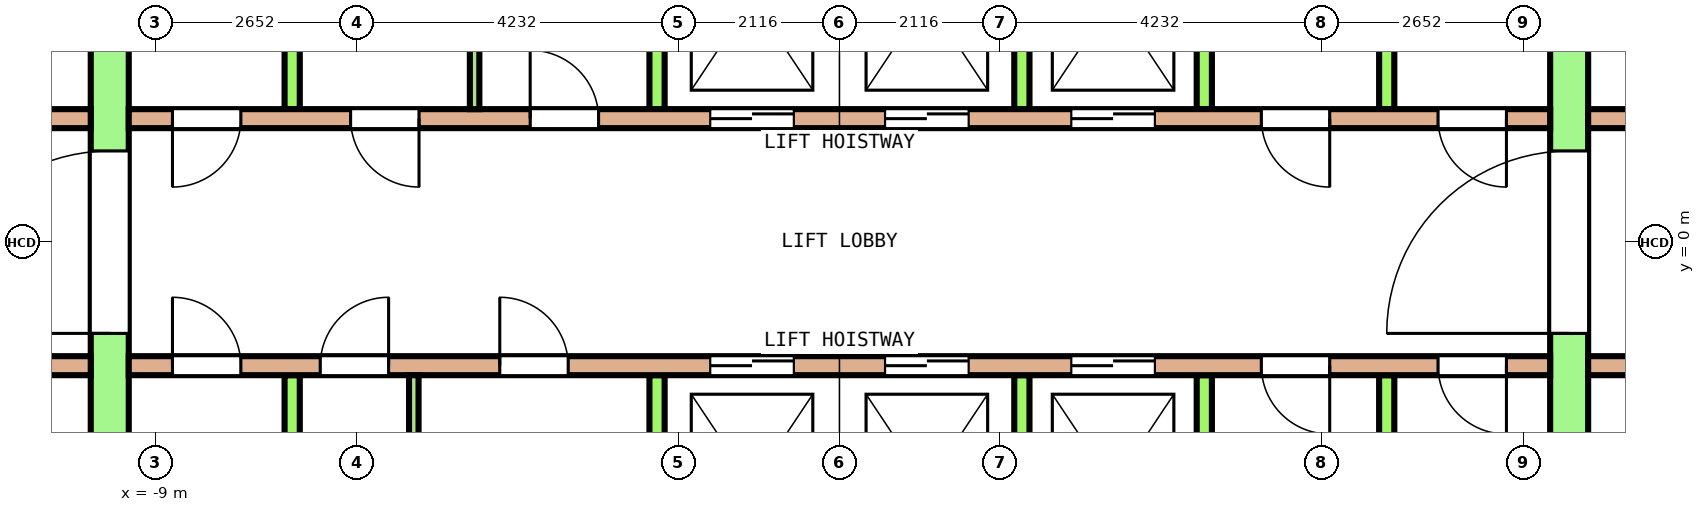
"""IFC4 building model, lengths in metres.
Left out: names, types, materials, properties, quantities, classifications, styles, units other than length and angle.
Written with IfcOpenShell. Run it as: python <this file> out.ifc"""

import sys

from ifc_helpers import new_model, si_unit, direction, frame, frame_2d, origin, place, context, subcontext, project, spatial, rectangle, extrude, element, fill, save


model = new_model("IFC4")
c1 = context("Model", 3, precision=1e-05, world=origin(), true_north=direction((0.0, 1.0)))
c2 = subcontext(c1, "Body", "Model", "MODEL_VIEW")
j1 = project(units=[si_unit("LENGTHUNIT", "METRE"), si_unit("PLANEANGLEUNIT", "RADIAN")], contexts=[c1])
p1 = place(None, origin())
s1 = spatial("IfcSite", under=j1, at=p1, CompositionType="ELEMENT")
p2 = place(p1, origin())
s2 = spatial("IfcBuilding", under=s1, at=p2, CompositionType="ELEMENT")
p3 = place(p2, frame((0.0, 0.0, 241.4)))
s3 = spatial("IfcBuildingStorey", under=s2, at=p3, CompositionType="ELEMENT", Elevation=241.4)
p4 = place(p3, frame((-9.6, -7.8, 0.0), z_axis=(0.0, 0.0, 1.0), x_axis=(0.0, 1.0, 0.0)))
e1 = element("IfcWall", 1, at=p4, inside=s3, PredefinedType="SHEAR", context=c2, shape_type="SweptSolid", body=[
    extrude(rectangle(XDim=15.6, YDim=0.5, at=frame_2d((7.8, 0.0))), origin(), (0.0, 0.0, 1.0), 3.7),
])
p5 = place(p4, frame((6.6, 0.0, 0.0)))
e2 = element("IfcOpeningElement", 2, at=p5, cuts=e1, PredefinedType="OPENING", context=c2, shape_type="SweptSolid", body=[
    extrude(rectangle(XDim=2.4, YDim=2.1, at=frame_2d((1.2, 1.05))), frame((0.0, 0.26, 0.0), z_axis=(0.0, -1.0, 0.0), x_axis=(1.0, 0.0, 0.0)), (0.0, 0.0, 1.0), 0.52),
])
p6 = place(p4, frame((13.5, 0.0, 0.0)))
e3 = element("IfcOpeningElement", 3, at=p6, cuts=e1, PredefinedType="OPENING", context=c2, shape_type="SweptSolid", body=[
    extrude(rectangle(XDim=1.2, YDim=2.1, at=frame_2d((0.6, 1.05))), frame((0.0, 0.26, 0.0), z_axis=(0.0, -1.0, 0.0), x_axis=(1.0, 0.0, 0.0)), (0.0, 0.0, 1.0), 0.52),
])
p7 = place(p4, frame((0.9, 0.0, 0.0)))
e4 = element("IfcOpeningElement", 4, at=p7, cuts=e1, PredefinedType="OPENING", context=c2, shape_type="SweptSolid", body=[
    extrude(rectangle(XDim=1.2, YDim=2.1, at=frame_2d((0.6, 1.05))), frame((0.0, 0.26, 0.0), z_axis=(0.0, -1.0, 0.0), x_axis=(1.0, 0.0, 0.0)), (0.0, 0.0, 1.0), 0.52),
])
p8 = place(p3, frame((9.6, -7.8, 0.0), z_axis=(0.0, 0.0, 1.0), x_axis=(0.0, 1.0, 0.0)))
e5 = element("IfcWall", 5, at=p8, inside=s3, PredefinedType="SHEAR", context=c2, shape_type="SweptSolid", body=[
    extrude(rectangle(XDim=15.6, YDim=0.5, at=frame_2d((7.8, 0.0))), origin(), (0.0, 0.0, 1.0), 3.7),
])
p9 = place(p8, frame((6.6, 0.0, 0.0)))
e6 = element("IfcOpeningElement", 6, at=p9, cuts=e5, PredefinedType="OPENING", context=c2, shape_type="SweptSolid", body=[
    extrude(rectangle(XDim=2.4, YDim=2.1, at=frame_2d((1.2, 1.05))), frame((0.0, 0.26, 0.0), z_axis=(0.0, -1.0, 0.0), x_axis=(1.0, 0.0, 0.0)), (0.0, 0.0, 1.0), 0.52),
])
p10 = place(p8, frame((13.5, 0.0, 0.0)))
e7 = element("IfcOpeningElement", 7, at=p10, cuts=e5, PredefinedType="OPENING", context=c2, shape_type="SweptSolid", body=[
    extrude(rectangle(XDim=1.2, YDim=2.1, at=frame_2d((0.6, 1.05))), frame((0.0, 0.26, 0.0), z_axis=(0.0, -1.0, 0.0), x_axis=(1.0, 0.0, 0.0)), (0.0, 0.0, 1.0), 0.52),
])
p11 = place(p8, frame((1.0, 0.0, 0.0)))
e8 = element("IfcOpeningElement", 8, at=p11, cuts=e5, PredefinedType="OPENING", context=c2, shape_type="SweptSolid", body=[
    extrude(rectangle(XDim=1.0, YDim=2.1, at=frame_2d((0.5, 1.05))), frame((0.0, 0.26, 0.0), z_axis=(0.0, -1.0, 0.0), x_axis=(1.0, 0.0, 0.0)), (0.0, 0.0, 1.0), 0.52),
])
p12 = place(p3, frame((-12.9, 1.625, 0.0), z_axis=(0.0, 0.0, 1.0), x_axis=(1.0, 0.0, 0.0)))
e9 = element("IfcWall", 9, at=p12, inside=s3, PredefinedType="SOLIDWALL", context=c2, shape_type="SweptSolid", body=[
    extrude(rectangle(XDim=3.05, YDim=0.25, at=frame_2d((1.525, 0.0))), origin(), (0.0, 0.0, 1.0), 3.7),
])
p13 = place(p12, frame((1.075, 0.0, 0.0)))
e10 = element("IfcOpeningElement", 10, at=p13, cuts=e9, PredefinedType="OPENING", context=c2, shape_type="SweptSolid", body=[
    extrude(rectangle(XDim=0.9, YDim=2.1, at=frame_2d((0.45, 1.05))), frame((0.0, 0.135, 0.0), z_axis=(0.0, -1.0, 0.0), x_axis=(1.0, 0.0, 0.0)), (0.0, 0.0, 1.0), 0.27),
])
p14 = place(p3, frame((-9.35, 1.625, 0.0), z_axis=(0.0, 0.0, 1.0), x_axis=(1.0, 0.0, 0.0)))
e11 = element("IfcWall", 11, at=p14, inside=s3, PredefinedType="SOLIDWALL", context=c2, shape_type="SweptSolid", body=[
    extrude(rectangle(XDim=18.7, YDim=0.25, at=frame_2d((9.35, 0.0))), origin(), (0.0, 0.0, 1.0), 3.7),
])
p15 = place(p14, frame((7.65, 0.0, 0.0)))
e12 = element("IfcOpeningElement", 12, at=p15, cuts=e11, PredefinedType="OPENING", context=c2, shape_type="SweptSolid", body=[
    extrude(rectangle(XDim=1.1, YDim=2.1, at=frame_2d((0.55, 1.05))), frame((0.0, 0.135, 0.0), z_axis=(0.0, -1.0, 0.0), x_axis=(1.0, 0.0, 0.0)), (0.0, 0.0, 1.0), 0.27),
])
p16 = place(p14, frame((9.95, 0.0, 0.0)))
e13 = element("IfcOpeningElement", 13, at=p16, cuts=e11, PredefinedType="OPENING", context=c2, shape_type="SweptSolid", body=[
    extrude(rectangle(XDim=1.1, YDim=2.1, at=frame_2d((0.55, 1.05))), frame((0.0, 0.135, 0.0), z_axis=(0.0, -1.0, 0.0), x_axis=(1.0, 0.0, 0.0)), (0.0, 0.0, 1.0), 0.27),
])
p17 = place(p14, frame((12.4, 0.0, 0.0)))
e14 = element("IfcOpeningElement", 14, at=p17, cuts=e11, PredefinedType="OPENING", context=c2, shape_type="SweptSolid", body=[
    extrude(rectangle(XDim=1.1, YDim=2.1, at=frame_2d((0.55, 1.05))), frame((0.0, 0.135, 0.0), z_axis=(0.0, -1.0, 0.0), x_axis=(1.0, 0.0, 0.0)), (0.0, 0.0, 1.0), 0.27),
])
p18 = place(p14, frame((0.575, 0.0, 0.0)))
e15 = element("IfcOpeningElement", 15, at=p18, cuts=e11, PredefinedType="OPENING", context=c2, shape_type="SweptSolid", body=[
    extrude(rectangle(XDim=0.9, YDim=2.1, at=frame_2d((0.45, 1.05))), frame((0.0, 0.135, 0.0), z_axis=(0.0, -1.0, 0.0), x_axis=(1.0, 0.0, 0.0)), (0.0, 0.0, 1.0), 0.27),
])
p19 = place(p14, frame((2.919, 0.0, 0.0)))
e16 = element("IfcOpeningElement", 16, at=p19, cuts=e11, PredefinedType="OPENING", context=c2, shape_type="SweptSolid", body=[
    extrude(rectangle(XDim=0.9, YDim=2.1, at=frame_2d((0.45, 1.05))), frame((0.0, 0.135, 0.0), z_axis=(0.0, -1.0, 0.0), x_axis=(1.0, 0.0, 0.0)), (0.0, 0.0, 1.0), 0.27),
])
p20 = place(p14, frame((5.281, 0.0, 0.0)))
e17 = element("IfcOpeningElement", 17, at=p20, cuts=e11, PredefinedType="OPENING", context=c2, shape_type="SweptSolid", body=[
    extrude(rectangle(XDim=0.9, YDim=2.1, at=frame_2d((0.45, 1.05))), frame((0.0, 0.135, 0.0), z_axis=(0.0, -1.0, 0.0), x_axis=(1.0, 0.0, 0.0)), (0.0, 0.0, 1.0), 0.27),
])
p21 = place(p14, frame((14.9, 0.0, 0.0)))
e18 = element("IfcOpeningElement", 18, at=p21, cuts=e11, PredefinedType="OPENING", context=c2, shape_type="SweptSolid", body=[
    extrude(rectangle(XDim=0.9, YDim=2.1, at=frame_2d((0.45, 1.05))), frame((0.0, 0.135, 0.0), z_axis=(0.0, -1.0, 0.0), x_axis=(1.0, 0.0, 0.0)), (0.0, 0.0, 1.0), 0.27),
])
p22 = place(p14, frame((17.225, 0.0, 0.0)))
e19 = element("IfcOpeningElement", 19, at=p22, cuts=e11, PredefinedType="OPENING", context=c2, shape_type="SweptSolid", body=[
    extrude(rectangle(XDim=0.9, YDim=2.1, at=frame_2d((0.45, 1.05))), frame((0.0, 0.135, 0.0), z_axis=(0.0, -1.0, 0.0), x_axis=(1.0, 0.0, 0.0)), (0.0, 0.0, 1.0), 0.27),
])
p23 = place(p3, frame((9.85, 1.625, 0.0), z_axis=(0.0, 0.0, 1.0), x_axis=(1.0, 0.0, 0.0)))
e20 = element("IfcWall", 20, at=p23, inside=s3, PredefinedType="SOLIDWALL", context=c2, shape_type="SweptSolid", body=[
    extrude(rectangle(XDim=3.05, YDim=0.25, at=frame_2d((1.525, 0.0))), origin(), (0.0, 0.0, 1.0), 3.7),
])
p24 = place(p23, frame((1.075, 0.0, 0.0)))
e21 = element("IfcOpeningElement", 21, at=p24, cuts=e20, PredefinedType="OPENING", context=c2, shape_type="SweptSolid", body=[
    extrude(rectangle(XDim=0.9, YDim=2.1, at=frame_2d((0.45, 1.05))), frame((0.0, 0.135, 0.0), z_axis=(0.0, -1.0, 0.0), x_axis=(1.0, 0.0, 0.0)), (0.0, 0.0, 1.0), 0.27),
])
for number, where, z_axis, x_axis in (
    (22, (-7.2, 1.75, 0.0), (0.0, 0.0, 1.0), (0.0, 1.0, 0.0)),
    (23, (-2.4, 1.75, 0.0), (0.0, 0.0, 1.0), (0.0, 1.0, 0.0)),
    (24, (2.4, 1.75, 0.0), (0.0, 0.0, 1.0), (0.0, 1.0, 0.0)),
    (25, (4.8, 1.75, 0.0), (0.0, 0.0, 1.0), (0.0, 1.0, 0.0)),
    (26, (7.2, 1.75, 0.0), (0.0, 0.0, 1.0), (0.0, 1.0, 0.0)),
):
    element("IfcWall", number, at=place(p3, frame(where, z_axis=z_axis, x_axis=x_axis)), inside=s3, PredefinedType="SOLIDWALL", context=c2, shape_type="SweptSolid", body=[
        extrude(rectangle(XDim=2.9, YDim=0.2, at=frame_2d((1.45, 0.0))), origin(), (0.0, 0.0, 1.0), 3.7),
    ])
p25 = place(p3, frame((-12.9, -1.625, 0.0), z_axis=(0.0, 0.0, 1.0), x_axis=(1.0, 0.0, 0.0)))
e27 = element("IfcWall", 27, at=p25, inside=s3, PredefinedType="SOLIDWALL", context=c2, shape_type="SweptSolid", body=[
    extrude(rectangle(XDim=3.05, YDim=0.25, at=frame_2d((1.525, 0.0))), origin(), (0.0, 0.0, 1.0), 3.7),
])
p26 = place(p25, frame((1.075, 0.0, 0.0)))
e28 = element("IfcOpeningElement", 28, at=p26, cuts=e27, PredefinedType="OPENING", context=c2, shape_type="SweptSolid", body=[
    extrude(rectangle(XDim=0.9, YDim=2.1, at=frame_2d((0.45, 1.05))), frame((0.0, 0.135, 0.0), z_axis=(0.0, -1.0, 0.0), x_axis=(1.0, 0.0, 0.0)), (0.0, 0.0, 1.0), 0.27),
])
p27 = place(p3, frame((-9.35, -1.625, 0.0), z_axis=(0.0, 0.0, 1.0), x_axis=(1.0, 0.0, 0.0)))
e29 = element("IfcWall", 29, at=p27, inside=s3, PredefinedType="SOLIDWALL", context=c2, shape_type="SweptSolid", body=[
    extrude(rectangle(XDim=18.7, YDim=0.25, at=frame_2d((9.35, 0.0))), origin(), (0.0, 0.0, 1.0), 3.7),
])
p28 = place(p27, frame((7.65, 0.0, 0.0)))
e30 = element("IfcOpeningElement", 30, at=p28, cuts=e29, PredefinedType="OPENING", context=c2, shape_type="SweptSolid", body=[
    extrude(rectangle(XDim=1.1, YDim=2.1, at=frame_2d((0.55, 1.05))), frame((0.0, 0.135, 0.0), z_axis=(0.0, -1.0, 0.0), x_axis=(1.0, 0.0, 0.0)), (0.0, 0.0, 1.0), 0.27),
])
p29 = place(p27, frame((9.95, 0.0, 0.0)))
e31 = element("IfcOpeningElement", 31, at=p29, cuts=e29, PredefinedType="OPENING", context=c2, shape_type="SweptSolid", body=[
    extrude(rectangle(XDim=1.1, YDim=2.1, at=frame_2d((0.55, 1.05))), frame((0.0, 0.135, 0.0), z_axis=(0.0, -1.0, 0.0), x_axis=(1.0, 0.0, 0.0)), (0.0, 0.0, 1.0), 0.27),
])
p30 = place(p27, frame((12.4, 0.0, 0.0)))
e32 = element("IfcOpeningElement", 32, at=p30, cuts=e29, PredefinedType="OPENING", context=c2, shape_type="SweptSolid", body=[
    extrude(rectangle(XDim=1.1, YDim=2.1, at=frame_2d((0.55, 1.05))), frame((0.0, 0.135, 0.0), z_axis=(0.0, -1.0, 0.0), x_axis=(1.0, 0.0, 0.0)), (0.0, 0.0, 1.0), 0.27),
])
p31 = place(p27, frame((0.575, 0.0, 0.0)))
e33 = element("IfcOpeningElement", 33, at=p31, cuts=e29, PredefinedType="OPENING", context=c2, shape_type="SweptSolid", body=[
    extrude(rectangle(XDim=0.9, YDim=2.1, at=frame_2d((0.45, 1.05))), frame((0.0, 0.135, 0.0), z_axis=(0.0, -1.0, 0.0), x_axis=(1.0, 0.0, 0.0)), (0.0, 0.0, 1.0), 0.27),
])
p32 = place(p27, frame((2.519, 0.0, 0.0)))
e34 = element("IfcOpeningElement", 34, at=p32, cuts=e29, PredefinedType="OPENING", context=c2, shape_type="SweptSolid", body=[
    extrude(rectangle(XDim=0.9, YDim=2.1, at=frame_2d((0.45, 1.05))), frame((0.0, 0.135, 0.0), z_axis=(0.0, -1.0, 0.0), x_axis=(1.0, 0.0, 0.0)), (0.0, 0.0, 1.0), 0.27),
])
p33 = place(p27, frame((4.881, 0.0, 0.0)))
e35 = element("IfcOpeningElement", 35, at=p33, cuts=e29, PredefinedType="OPENING", context=c2, shape_type="SweptSolid", body=[
    extrude(rectangle(XDim=0.9, YDim=2.1, at=frame_2d((0.45, 1.05))), frame((0.0, 0.135, 0.0), z_axis=(0.0, -1.0, 0.0), x_axis=(1.0, 0.0, 0.0)), (0.0, 0.0, 1.0), 0.27),
])
p34 = place(p27, frame((14.9, 0.0, 0.0)))
e36 = element("IfcOpeningElement", 36, at=p34, cuts=e29, PredefinedType="OPENING", context=c2, shape_type="SweptSolid", body=[
    extrude(rectangle(XDim=0.9, YDim=2.1, at=frame_2d((0.45, 1.05))), frame((0.0, 0.135, 0.0), z_axis=(0.0, -1.0, 0.0), x_axis=(1.0, 0.0, 0.0)), (0.0, 0.0, 1.0), 0.27),
])
p35 = place(p27, frame((17.225, 0.0, 0.0)))
e37 = element("IfcOpeningElement", 37, at=p35, cuts=e29, PredefinedType="OPENING", context=c2, shape_type="SweptSolid", body=[
    extrude(rectangle(XDim=0.9, YDim=2.1, at=frame_2d((0.45, 1.05))), frame((0.0, 0.135, 0.0), z_axis=(0.0, -1.0, 0.0), x_axis=(1.0, 0.0, 0.0)), (0.0, 0.0, 1.0), 0.27),
])
p36 = place(p3, frame((9.85, -1.625, 0.0), z_axis=(0.0, 0.0, 1.0), x_axis=(1.0, 0.0, 0.0)))
e38 = element("IfcWall", 38, at=p36, inside=s3, PredefinedType="SOLIDWALL", context=c2, shape_type="SweptSolid", body=[
    extrude(rectangle(XDim=3.05, YDim=0.25, at=frame_2d((1.525, 0.0))), origin(), (0.0, 0.0, 1.0), 3.7),
])
p37 = place(p36, frame((1.075, 0.0, 0.0)))
e39 = element("IfcOpeningElement", 39, at=p37, cuts=e38, PredefinedType="OPENING", context=c2, shape_type="SweptSolid", body=[
    extrude(rectangle(XDim=0.9, YDim=2.1, at=frame_2d((0.45, 1.05))), frame((0.0, 0.135, 0.0), z_axis=(0.0, -1.0, 0.0), x_axis=(1.0, 0.0, 0.0)), (0.0, 0.0, 1.0), 0.27),
])
for number, where, z_axis, x_axis in (
    (40, (-7.2, -4.65, 0.0), (0.0, 0.0, 1.0), (0.0, 1.0, 0.0)),
    (41, (-2.4, -4.65, 0.0), (0.0, 0.0, 1.0), (0.0, 1.0, 0.0)),
    (42, (2.4, -4.65, 0.0), (0.0, 0.0, 1.0), (0.0, 1.0, 0.0)),
    (43, (4.8, -4.65, 0.0), (0.0, 0.0, 1.0), (0.0, 1.0, 0.0)),
    (44, (7.2, -4.65, 0.0), (0.0, 0.0, 1.0), (0.0, 1.0, 0.0)),
):
    element("IfcWall", number, at=place(p3, frame(where, z_axis=z_axis, x_axis=x_axis)), inside=s3, PredefinedType="SOLIDWALL", context=c2, shape_type="SweptSolid", body=[
        extrude(rectangle(XDim=2.9, YDim=0.2, at=frame_2d((1.45, 0.0))), origin(), (0.0, 0.0, 1.0), 3.7),
    ])
for number, where, z_axis, x_axis in (
    (45, (-4.8, 1.75, 0.0), (0.0, 0.0, 1.0), (0.0, 1.0, 0.0)),
    (46, (-5.6, -4.65, 0.0), (0.0, 0.0, 1.0), (0.0, 1.0, 0.0)),
):
    element("IfcWall", number, at=place(p3, frame(where, z_axis=z_axis, x_axis=x_axis)), inside=s3, PredefinedType="PARTITIONING", context=c2, shape_type="SweptSolid", body=[
        extrude(rectangle(XDim=2.9, YDim=0.125, at=frame_2d((1.45, 0.0))), origin(), (0.0, 0.0, 1.0), 3.7),
    ])
p38 = place(p15, origin())
e47 = element("IfcDoor", 47, at=p38, inside=s3, OperationType="DOUBLE_DOOR_SLIDING", PredefinedType="DOOR", context=c2, shape_type="SweptSolid", body=[
    extrude(rectangle(XDim=1.1, YDim=2.1, at=frame_2d((0.55, 1.05))), frame((0.0, 0.075, 0.0), z_axis=(0.0, -1.0, 0.0), x_axis=(1.0, 0.0, 0.0)), (0.0, 0.0, 1.0), 0.15),
])
fill(e12, e47)
p39 = place(p16, origin())
e48 = element("IfcDoor", 48, at=p39, inside=s3, OperationType="DOUBLE_DOOR_SLIDING", PredefinedType="DOOR", context=c2, shape_type="SweptSolid", body=[
    extrude(rectangle(XDim=1.1, YDim=2.1, at=frame_2d((0.55, 1.05))), frame((0.0, 0.075, 0.0), z_axis=(0.0, -1.0, 0.0), x_axis=(1.0, 0.0, 0.0)), (0.0, 0.0, 1.0), 0.15),
])
fill(e13, e48)
p40 = place(p17, origin())
e49 = element("IfcDoor", 49, at=p40, inside=s3, OperationType="DOUBLE_DOOR_SLIDING", PredefinedType="DOOR", context=c2, shape_type="SweptSolid", body=[
    extrude(rectangle(XDim=1.1, YDim=2.1, at=frame_2d((0.55, 1.05))), frame((0.0, 0.075, 0.0), z_axis=(0.0, -1.0, 0.0), x_axis=(1.0, 0.0, 0.0)), (0.0, 0.0, 1.0), 0.15),
])
fill(e14, e49)
p41 = place(p28, origin())
e50 = element("IfcDoor", 50, at=p41, inside=s3, OperationType="DOUBLE_DOOR_SLIDING", PredefinedType="DOOR", context=c2, shape_type="SweptSolid", body=[
    extrude(rectangle(XDim=1.1, YDim=2.1, at=frame_2d((0.55, 1.05))), frame((0.0, 0.075, 0.0), z_axis=(0.0, -1.0, 0.0), x_axis=(1.0, 0.0, 0.0)), (0.0, 0.0, 1.0), 0.15),
])
fill(e30, e50)
p42 = place(p29, origin())
e51 = element("IfcDoor", 51, at=p42, inside=s3, OperationType="DOUBLE_DOOR_SLIDING", PredefinedType="DOOR", context=c2, shape_type="SweptSolid", body=[
    extrude(rectangle(XDim=1.1, YDim=2.1, at=frame_2d((0.55, 1.05))), frame((0.0, 0.075, 0.0), z_axis=(0.0, -1.0, 0.0), x_axis=(1.0, 0.0, 0.0)), (0.0, 0.0, 1.0), 0.15),
])
fill(e31, e51)
p43 = place(p30, origin())
e52 = element("IfcDoor", 52, at=p43, inside=s3, OperationType="DOUBLE_DOOR_SLIDING", PredefinedType="DOOR", context=c2, shape_type="SweptSolid", body=[
    extrude(rectangle(XDim=1.1, YDim=2.1, at=frame_2d((0.55, 1.05))), frame((0.0, 0.075, 0.0), z_axis=(0.0, -1.0, 0.0), x_axis=(1.0, 0.0, 0.0)), (0.0, 0.0, 1.0), 0.15),
])
fill(e32, e52)
p44 = place(p5, origin())
e53 = element("IfcDoor", 53, at=p44, inside=s3, OperationType="DOUBLE_DOOR_SINGLE_SWING", PredefinedType="DOOR", context=c2, shape_type="SweptSolid", body=[
    extrude(rectangle(XDim=2.4, YDim=2.1, at=frame_2d((1.2, 1.05))), frame((0.0, 0.2, 0.0), z_axis=(0.0, -1.0, 0.0), x_axis=(1.0, 0.0, 0.0)), (0.0, 0.0, 1.0), 0.4),
])
fill(e2, e53)
p45 = place(p9, origin())
e54 = element("IfcDoor", 54, at=p45, inside=s3, OperationType="DOUBLE_DOOR_SINGLE_SWING", PredefinedType="DOOR", context=c2, shape_type="SweptSolid", body=[
    extrude(rectangle(XDim=2.4, YDim=2.1, at=frame_2d((1.2, 1.05))), frame((0.0, 0.2, 0.0), z_axis=(0.0, -1.0, 0.0), x_axis=(1.0, 0.0, 0.0)), (0.0, 0.0, 1.0), 0.4),
])
fill(e6, e54)
p46 = place(p18, origin())
e55 = element("IfcDoor", 55, at=p46, inside=s3, OperationType="SINGLE_SWING_LEFT", PredefinedType="DOOR", context=c2, shape_type="SweptSolid", body=[
    extrude(rectangle(XDim=0.9, YDim=2.1, at=frame_2d((0.45, 1.05))), frame((0.0, 0.075, 0.0), z_axis=(0.0, -1.0, 0.0), x_axis=(1.0, 0.0, 0.0)), (0.0, 0.0, 1.0), 0.15),
])
fill(e15, e55)
p47 = place(p19, origin())
e56 = element("IfcDoor", 56, at=p47, inside=s3, OperationType="SINGLE_SWING_RIGHT", PredefinedType="DOOR", context=c2, shape_type="SweptSolid", body=[
    extrude(rectangle(XDim=0.9, YDim=2.1, at=frame_2d((0.45, 1.05))), frame((0.0, 0.075, 0.0), z_axis=(0.0, -1.0, 0.0), x_axis=(1.0, 0.0, 0.0)), (0.0, 0.0, 1.0), 0.15),
])
fill(e16, e56)
p48 = place(p20, origin())
e57 = element("IfcDoor", 57, at=p48, inside=s3, OperationType="SINGLE_SWING_LEFT", PredefinedType="DOOR", context=c2, shape_type="SweptSolid", body=[
    extrude(rectangle(XDim=0.9, YDim=2.1, at=frame_2d((0.45, 1.05))), frame((0.0, 0.075, 0.0), z_axis=(0.0, -1.0, 0.0), x_axis=(1.0, 0.0, 0.0)), (0.0, 0.0, 1.0), 0.15),
])
fill(e17, e57)
p49 = place(p21, origin())
e58 = element("IfcDoor", 58, at=p49, inside=s3, OperationType="SINGLE_SWING_RIGHT", PredefinedType="DOOR", context=c2, shape_type="SweptSolid", body=[
    extrude(rectangle(XDim=0.9, YDim=2.1, at=frame_2d((0.45, 1.05))), frame((0.0, 0.075, 0.0), z_axis=(0.0, -1.0, 0.0), x_axis=(1.0, 0.0, 0.0)), (0.0, 0.0, 1.0), 0.15),
])
fill(e18, e58)
p50 = place(p22, origin())
e59 = element("IfcDoor", 59, at=p50, inside=s3, OperationType="SINGLE_SWING_LEFT", PredefinedType="DOOR", context=c2, shape_type="SweptSolid", body=[
    extrude(rectangle(XDim=0.9, YDim=2.1, at=frame_2d((0.45, 1.05))), frame((0.0, 0.075, 0.0), z_axis=(0.0, -1.0, 0.0), x_axis=(1.0, 0.0, 0.0)), (0.0, 0.0, 1.0), 0.15),
])
fill(e19, e59)
p51 = place(p31, origin())
e60 = element("IfcDoor", 60, at=p51, inside=s3, OperationType="SINGLE_SWING_RIGHT", PredefinedType="DOOR", context=c2, shape_type="SweptSolid", body=[
    extrude(rectangle(XDim=0.9, YDim=2.1, at=frame_2d((0.45, 1.05))), frame((0.0, 0.075, 0.0), z_axis=(0.0, -1.0, 0.0), x_axis=(1.0, 0.0, 0.0)), (0.0, 0.0, 1.0), 0.15),
])
fill(e33, e60)
p52 = place(p32, origin())
e61 = element("IfcDoor", 61, at=p52, inside=s3, OperationType="SINGLE_SWING_LEFT", PredefinedType="DOOR", context=c2, shape_type="SweptSolid", body=[
    extrude(rectangle(XDim=0.9, YDim=2.1, at=frame_2d((0.45, 1.05))), frame((0.0, 0.075, 0.0), z_axis=(0.0, -1.0, 0.0), x_axis=(1.0, 0.0, 0.0)), (0.0, 0.0, 1.0), 0.15),
])
fill(e34, e61)
p53 = place(p33, origin())
e62 = element("IfcDoor", 62, at=p53, inside=s3, OperationType="SINGLE_SWING_RIGHT", PredefinedType="DOOR", context=c2, shape_type="SweptSolid", body=[
    extrude(rectangle(XDim=0.9, YDim=2.1, at=frame_2d((0.45, 1.05))), frame((0.0, 0.075, 0.0), z_axis=(0.0, -1.0, 0.0), x_axis=(1.0, 0.0, 0.0)), (0.0, 0.0, 1.0), 0.15),
])
fill(e35, e62)
p54 = place(p34, origin())
e63 = element("IfcDoor", 63, at=p54, inside=s3, OperationType="SINGLE_SWING_LEFT", PredefinedType="DOOR", context=c2, shape_type="SweptSolid", body=[
    extrude(rectangle(XDim=0.9, YDim=2.1, at=frame_2d((0.45, 1.05))), frame((0.0, 0.075, 0.0), z_axis=(0.0, -1.0, 0.0), x_axis=(1.0, 0.0, 0.0)), (0.0, 0.0, 1.0), 0.15),
])
fill(e36, e63)
p55 = place(p35, origin())
e64 = element("IfcDoor", 64, at=p55, inside=s3, OperationType="SINGLE_SWING_RIGHT", PredefinedType="DOOR", context=c2, shape_type="SweptSolid", body=[
    extrude(rectangle(XDim=0.9, YDim=2.1, at=frame_2d((0.45, 1.05))), frame((0.0, 0.075, 0.0), z_axis=(0.0, -1.0, 0.0), x_axis=(1.0, 0.0, 0.0)), (0.0, 0.0, 1.0), 0.15),
])
fill(e37, e64)
save(model, sys.argv[1])
